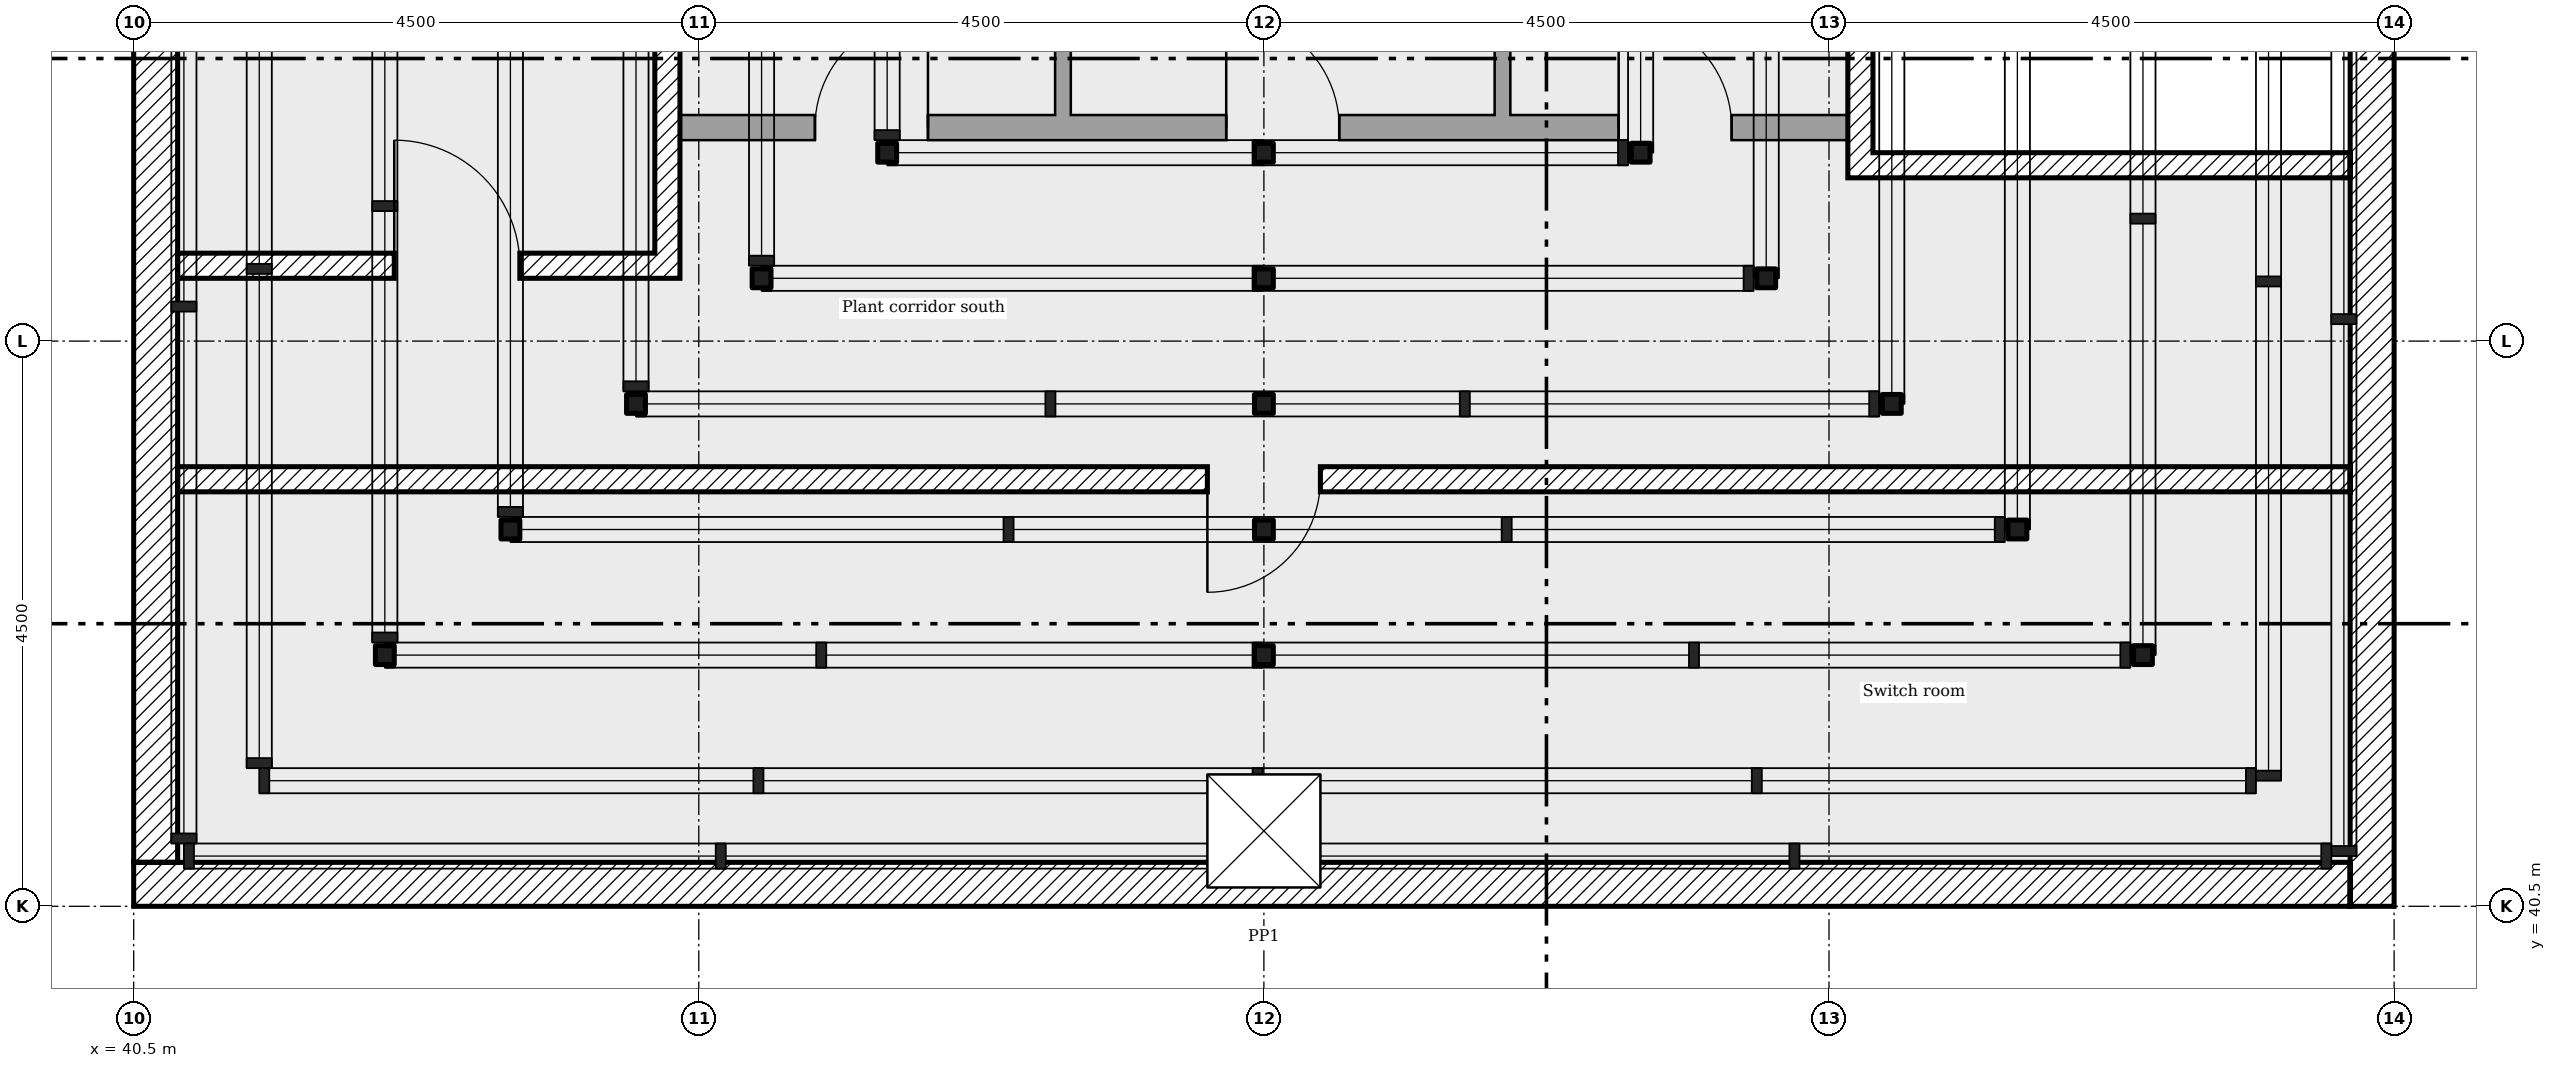
"""IFC4 building model, lengths in metres.
Left out: names, types, materials, properties, quantities, classifications, styles, units other than length and angle.
Written with IfcOpenShell. Run it as: python <this file> out.ifc"""

import sys

from ifc_helpers import new_model, si_unit, direction, frame, frame_2d, origin, origin_2d, place, context, subcontext, project, spatial, rectangle, hollow_rectangle, extrude, element, fill, save


model = new_model("IFC4")
c1 = context("Model", 3, precision=1e-05, world=origin(), true_north=direction((0.0, 1.0)))
c2 = subcontext(c1, "Body", "Model", "MODEL_VIEW")
j1 = project(units=[si_unit("LENGTHUNIT", "METRE"), si_unit("PLANEANGLEUNIT", "RADIAN")], contexts=[c1])
p1 = place(None, origin())
s1 = spatial("IfcSite", under=j1, at=p1, CompositionType="ELEMENT")
p2 = place(p1, origin())
s2 = spatial("IfcBuilding", under=s1, at=p2, CompositionType="ELEMENT")
p3 = place(p2, frame((0.0, 0.0, 279.1)))
s3 = spatial("IfcBuildingStorey", under=s2, at=p3, CompositionType="ELEMENT", Elevation=279.1)
p4 = place(p3, frame((40.5, 40.625, 4.5)))
e1 = element("IfcWall", 1, at=p4, inside=s3, PredefinedType="PARAPET", context=c2, shape_type="SweptSolid", body=[
    extrude(rectangle(XDim=18.0, YDim=0.25, at=frame_2d((9.0, 0.0))), origin(), (0.0, 0.0, 1.0), 1.1),
])
p5 = place(p3, frame((58.375, 40.75, 4.5), z_axis=(0.0, 0.0, 1.0), x_axis=(0.0, 1.0, 0.0)))
e2 = element("IfcWall", 2, at=p5, inside=s3, PredefinedType="PARAPET", context=c2, shape_type="SweptSolid", body=[
    extrude(rectangle(XDim=17.75, YDim=0.25, at=frame_2d((8.875, 0.0))), origin(), (0.0, 0.0, 1.0), 1.1),
])
p6 = place(p3, frame((40.625, 58.25, 4.5), z_axis=(0.0, 0.0, 1.0), x_axis=(0.0, -1.0, 0.0)))
e3 = element("IfcWall", 3, at=p6, inside=s3, PredefinedType="PARAPET", context=c2, shape_type="SweptSolid", body=[
    extrude(rectangle(XDim=17.5, YDim=0.25, at=frame_2d((8.75, 0.0))), origin(), (0.0, 0.0, 1.0), 1.1),
])
for number, where in (
    (4, (42.5, 42.5, 4.5)),
    (5, (49.5, 42.5, 4.5)),
    (6, (56.5, 42.5, 4.5)),
):
    element("IfcColumn", number, at=place(p3, frame(where)), inside=s3, PredefinedType="COLUMN", context=c2, shape_type="SweptSolid", body=[
        extrude(hollow_rectangle(XDim=0.15, YDim=0.15, WallThickness=0.008, at=origin_2d()), origin(), (0.0, 0.0, 1.0), 1.8),
    ])
for number, where in (
    (7, (43.5, 43.5, 4.5)),
    (8, (49.5, 43.5, 4.5)),
    (9, (55.5, 43.5, 4.5)),
):
    element("IfcColumn", number, at=place(p3, frame(where)), inside=s3, PredefinedType="COLUMN", context=c2, shape_type="SweptSolid", body=[
        extrude(hollow_rectangle(XDim=0.15, YDim=0.15, WallThickness=0.008, at=origin_2d()), origin(), (0.0, 0.0, 1.0), 3.95),
    ])
for number, where in (
    (10, (44.5, 44.5, 4.5)),
    (11, (49.5, 44.5, 4.5)),
    (12, (54.5, 44.5, 4.5)),
):
    element("IfcColumn", number, at=place(p3, frame(where)), inside=s3, PredefinedType="COLUMN", context=c2, shape_type="SweptSolid", body=[
        extrude(hollow_rectangle(XDim=0.15, YDim=0.15, WallThickness=0.008, at=origin_2d()), origin(), (0.0, 0.0, 1.0), 6.1),
    ])
for number, where in (
    (13, (45.5, 45.5, 4.5)),
    (14, (49.5, 45.5, 4.5)),
    (15, (53.5, 45.5, 4.5)),
):
    element("IfcColumn", number, at=place(p3, frame(where)), inside=s3, PredefinedType="COLUMN", context=c2, shape_type="SweptSolid", body=[
        extrude(hollow_rectangle(XDim=0.15, YDim=0.15, WallThickness=0.008, at=origin_2d()), origin(), (0.0, 0.0, 1.0), 8.29),
    ])
for number, where in (
    (16, (46.5, 46.5, 4.5)),
    (17, (49.5, 46.5, 4.5)),
    (18, (52.5, 46.5, 4.5)),
):
    element("IfcColumn", number, at=place(p3, frame(where)), inside=s3, PredefinedType="COLUMN", context=c2, shape_type="SweptSolid", body=[
        extrude(hollow_rectangle(XDim=0.15, YDim=0.15, WallThickness=0.008, at=origin_2d()), origin(), (0.0, 0.0, 1.0), 10.48),
    ])
p7 = place(p3, frame((58.325, 40.5, 0.0), z_axis=(0.0, 0.0, 1.0), x_axis=(0.0, 1.0, 0.0)))
e19 = element("IfcWall", 19, at=p7, inside=s3, PredefinedType="SHEAR", context=c2, shape_type="SweptSolid", body=[
    extrude(rectangle(XDim=18.0, YDim=0.35, at=frame_2d((9.0, 0.0))), origin(), (0.0, 0.0, 1.0), 3.3),
])
p8 = place(p3, frame((40.5, 40.675, 0.0)))
e20 = element("IfcWall", 20, at=p8, inside=s3, PredefinedType="SHEAR", context=c2, shape_type="SweptSolid", body=[
    extrude(rectangle(XDim=17.65, YDim=0.35, at=frame_2d((8.825, 0.0))), origin(), (0.0, 0.0, 1.0), 3.3),
])
p9 = place(p3, frame((40.675, 40.85, 0.0), z_axis=(0.0, 0.0, 1.0), x_axis=(0.0, 1.0, 0.0)))
e21 = element("IfcWall", 21, at=p9, inside=s3, PredefinedType="SHEAR", context=c2, shape_type="SweptSolid", body=[
    extrude(rectangle(XDim=17.3, YDim=0.35, at=frame_2d((8.65, 0.0))), origin(), (0.0, 0.0, 1.0), 3.3),
])
p10 = place(p3, frame((40.85, 43.9, 0.0)))
e22 = element("IfcWall", 22, at=p10, inside=s3, PredefinedType="SHEAR", context=c2, shape_type="SweptSolid", body=[
    extrude(rectangle(XDim=17.3, YDim=0.2, at=frame_2d((8.65, 0.0))), origin(), (0.0, 0.0, 1.0), 3.3),
])
p11 = place(p10, frame((8.2, 0.0, 0.0)))
e23 = element("IfcOpeningElement", 23, at=p11, cuts=e22, PredefinedType="OPENING", context=c2, shape_type="SweptSolid", body=[
    extrude(rectangle(XDim=0.9, YDim=2.1, at=frame_2d((0.45, 1.05))), frame((0.0, 0.11, 0.0), z_axis=(0.0, -1.0, 0.0), x_axis=(1.0, 0.0, 0.0)), (0.0, 0.0, 1.0), 0.22),
])
p12 = place(p3, frame((44.75, 45.5, 0.0), z_axis=(0.0, 0.0, 1.0), x_axis=(0.0, 1.0, 0.0)))
e24 = element("IfcWall", 24, at=p12, inside=s3, PredefinedType="SHEAR", context=c2, shape_type="SweptSolid", body=[
    extrude(rectangle(XDim=7.2, YDim=0.2, at=frame_2d((3.6, 0.0))), origin(), (0.0, 0.0, 1.0), 3.3),
])
p13 = place(p3, frame((40.85, 45.6, 0.0)))
e25 = element("IfcWall", 25, at=p13, inside=s3, PredefinedType="SHEAR", context=c2, shape_type="SweptSolid", body=[
    extrude(rectangle(XDim=3.8, YDim=0.2, at=frame_2d((1.9, 0.0))), origin(), (0.0, 0.0, 1.0), 3.3),
])
p14 = place(p13, frame((1.725, 0.0, 0.0)))
e26 = element("IfcOpeningElement", 26, at=p14, cuts=e25, PredefinedType="OPENING", context=c2, shape_type="SweptSolid", body=[
    extrude(rectangle(XDim=1.0, YDim=2.1, at=frame_2d((0.5, 1.05))), frame((0.0, 0.11, 0.0), z_axis=(0.0, -1.0, 0.0), x_axis=(1.0, 0.0, 0.0)), (0.0, 0.0, 1.0), 0.22),
])
p15 = place(p3, frame((54.15, 46.4, 0.0)))
e27 = element("IfcWall", 27, at=p15, inside=s3, PredefinedType="SHEAR", context=c2, shape_type="SweptSolid", body=[
    extrude(rectangle(XDim=4.0, YDim=0.2, at=frame_2d((2.0, 0.0))), origin(), (0.0, 0.0, 1.0), 3.3),
])
p16 = place(p3, frame((54.25, 46.5, 0.0), z_axis=(0.0, 0.0, 1.0), x_axis=(0.0, 1.0, 0.0)))
e28 = element("IfcWall", 28, at=p16, inside=s3, PredefinedType="SHEAR", context=c2, shape_type="SweptSolid", body=[
    extrude(rectangle(XDim=6.8, YDim=0.2, at=frame_2d((3.4, 0.0))), origin(), (0.0, 0.0, 1.0), 3.3),
])
p17 = place(p3, frame((44.85, 46.7, 0.0)))
e29 = element("IfcWall", 29, at=p17, inside=s3, PredefinedType="PARTITIONING", context=c2, shape_type="SweptSolid", body=[
    extrude(rectangle(XDim=9.3, YDim=0.2, at=frame_2d((4.65, 0.0))), origin(), (0.0, 0.0, 1.0), 3.3),
])
p18 = place(p17, frame((1.075, 0.0, 0.0)))
e30 = element("IfcOpeningElement", 30, at=p18, cuts=e29, PredefinedType="OPENING", context=c2, shape_type="SweptSolid", body=[
    extrude(rectangle(XDim=0.9, YDim=2.1, at=frame_2d((0.45, 1.05))), frame((0.0, 0.11, 0.0), z_axis=(0.0, -1.0, 0.0), x_axis=(1.0, 0.0, 0.0)), (0.0, 0.0, 1.0), 0.22),
])
p19 = place(p17, frame((4.35, 0.0, 0.0)))
e31 = element("IfcOpeningElement", 31, at=p19, cuts=e29, PredefinedType="OPENING", context=c2, shape_type="SweptSolid", body=[
    extrude(rectangle(XDim=0.9, YDim=2.1, at=frame_2d((0.45, 1.05))), frame((0.0, 0.11, 0.0), z_axis=(0.0, -1.0, 0.0), x_axis=(1.0, 0.0, 0.0)), (0.0, 0.0, 1.0), 0.22),
])
p20 = place(p17, frame((7.475, 0.0, 0.0)))
e32 = element("IfcOpeningElement", 32, at=p20, cuts=e29, PredefinedType="OPENING", context=c2, shape_type="SweptSolid", body=[
    extrude(rectangle(XDim=0.9, YDim=2.1, at=frame_2d((0.45, 1.05))), frame((0.0, 0.11, 0.0), z_axis=(0.0, -1.0, 0.0), x_axis=(1.0, 0.0, 0.0)), (0.0, 0.0, 1.0), 0.22),
])
p21 = place(p3, frame((47.9, 46.8, 0.0), z_axis=(0.0, 0.0, 1.0), x_axis=(0.0, 1.0, 0.0)))
e33 = element("IfcWall", 33, at=p21, inside=s3, PredefinedType="PARTITIONING", context=c2, shape_type="SweptSolid", body=[
    extrude(rectangle(XDim=4.7, YDim=0.125, at=frame_2d((2.35, 0.0))), origin(), (0.0, 0.0, 1.0), 3.3),
])
p22 = place(p3, frame((51.4, 46.8, 0.0), z_axis=(0.0, 0.0, 1.0), x_axis=(0.0, 1.0, 0.0)))
e34 = element("IfcWall", 34, at=p22, inside=s3, PredefinedType="PARTITIONING", context=c2, shape_type="SweptSolid", body=[
    extrude(rectangle(XDim=2.762, YDim=0.125, at=frame_2d((1.381, 0.0))), origin(), (0.0, 0.0, 1.0), 3.3),
])
p23 = place(p3, frame((0.0, 0.0, 3.3)))
p24 = place(p23, frame((49.5, 41.1, -0.01)))
p25 = place(p24, frame((0.0, 0.0, 1.16)))
e35 = element("IfcDoor", 35, at=p25, inside=s3, OperationType="SINGLE_SWING_LEFT", PredefinedType="TRAPDOOR", context=c2, shape_type="SweptSolid", body=[
    extrude(rectangle(XDim=0.9, YDim=0.9, at=origin_2d()), origin(), (0.0, 0.0, 1.0), 0.05),
])
p26 = place(p14, origin())
e36 = element("IfcDoor", 36, at=p26, inside=s3, OperationType="SINGLE_SWING_RIGHT", PredefinedType="DOOR", context=c2, shape_type="SweptSolid", body=[
    extrude(rectangle(XDim=1.0, YDim=2.1, at=frame_2d((0.5, 1.05))), frame((0.0, 0.025, 0.0), z_axis=(0.0, -1.0, 0.0), x_axis=(1.0, 0.0, 0.0)), (0.0, 0.0, 1.0), 0.05),
])
fill(e26, e36)
p27 = place(p11, frame((0.9, 0.0, 0.0), x_axis=(-1.0, 0.0, 0.0)))
e37 = element("IfcDoor", 37, at=p27, inside=s3, OperationType="SINGLE_SWING_LEFT", PredefinedType="DOOR", context=c2, shape_type="SweptSolid", body=[
    extrude(rectangle(XDim=0.9, YDim=2.1, at=frame_2d((0.45, 1.05))), frame((0.0, 0.025, 0.0), z_axis=(0.0, -1.0, 0.0), x_axis=(1.0, 0.0, 0.0)), (0.0, 0.0, 1.0), 0.05),
])
fill(e23, e37)
p28 = place(p18, origin())
e38 = element("IfcDoor", 38, at=p28, inside=s3, OperationType="SINGLE_SWING_LEFT", PredefinedType="DOOR", context=c2, shape_type="SweptSolid", body=[
    extrude(rectangle(XDim=0.9, YDim=2.1, at=frame_2d((0.45, 1.05))), frame((0.0, 0.025, 0.0), z_axis=(0.0, -1.0, 0.0), x_axis=(1.0, 0.0, 0.0)), (0.0, 0.0, 1.0), 0.05),
])
fill(e30, e38)
p29 = place(p19, origin())
e39 = element("IfcDoor", 39, at=p29, inside=s3, OperationType="SINGLE_SWING_RIGHT", PredefinedType="DOOR", context=c2, shape_type="SweptSolid", body=[
    extrude(rectangle(XDim=0.9, YDim=2.1, at=frame_2d((0.45, 1.05))), frame((0.0, 0.025, 0.0), z_axis=(0.0, -1.0, 0.0), x_axis=(1.0, 0.0, 0.0)), (0.0, 0.0, 1.0), 0.05),
])
fill(e31, e39)
p30 = place(p20, origin())
e40 = element("IfcDoor", 40, at=p30, inside=s3, OperationType="SINGLE_SWING_RIGHT", PredefinedType="DOOR", context=c2, shape_type="SweptSolid", body=[
    extrude(rectangle(XDim=0.9, YDim=2.1, at=frame_2d((0.45, 1.05))), frame((0.0, 0.025, 0.0), z_axis=(0.0, -1.0, 0.0), x_axis=(1.0, 0.0, 0.0)), (0.0, 0.0, 1.0), 0.05),
])
fill(e32, e40)
save(model, sys.argv[1])
